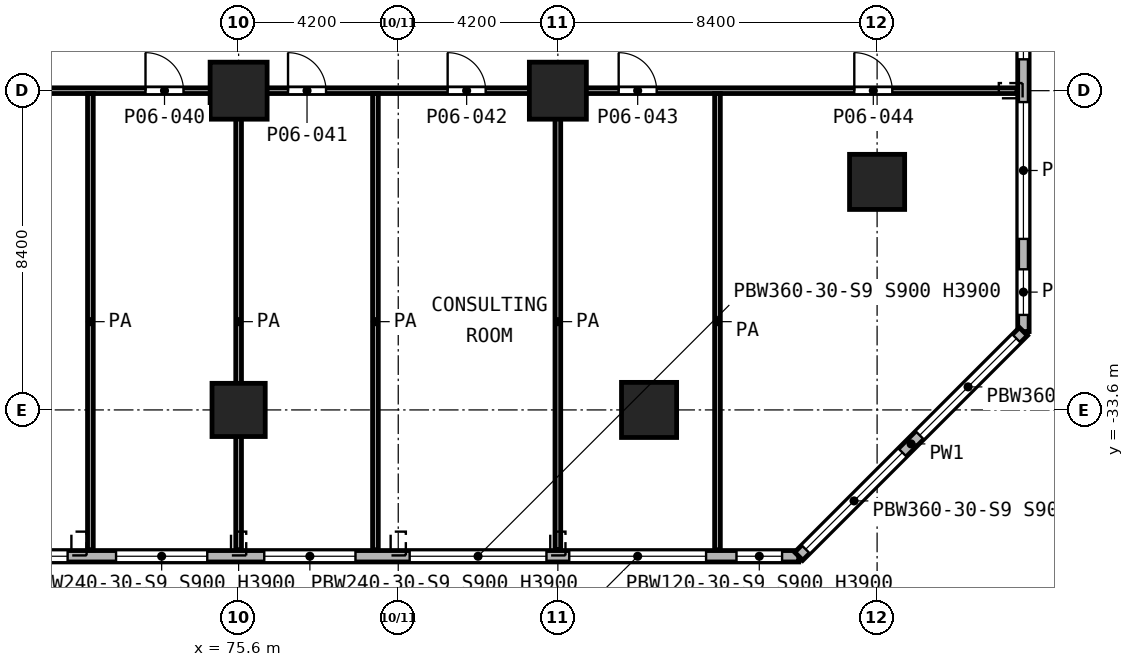
"""IFC4 building model, lengths in metres.
Left out: names, types, materials, properties, quantities, classifications, styles, units other than length and angle.
Written with IfcOpenShell. Run it as: python <this file> out.ifc"""

import sys

from ifc_helpers import new_model, si_unit, direction, frame, frame_2d, origin, origin_2d, place, context, subcontext, project, spatial, rectangle, extrude, element, fill, save


model = new_model("IFC4")
c1 = context("Model", 3, precision=1e-05, world=origin(), true_north=direction((0.0, 1.0)))
c2 = subcontext(c1, "Body", "Model", "MODEL_VIEW")
j1 = project(units=[si_unit("LENGTHUNIT", "METRE"), si_unit("PLANEANGLEUNIT", "RADIAN")], contexts=[c1])
p1 = place(None, origin())
s1 = spatial("IfcSite", under=j1, at=p1, CompositionType="ELEMENT")
p2 = place(p1, origin())
s2 = spatial("IfcBuilding", under=s1, at=p2, CompositionType="ELEMENT")
p3 = place(p2, frame((0.0, 0.0, 29.0)))
s3 = spatial("IfcBuildingStorey", under=s2, at=p3, CompositionType="ELEMENT", Elevation=29.0)
for number, where, z_axis, x_axis in (
    (1, (75.6, -25.2, 0.0), (0.0, 0.0, 1.0), (1.0, 0.0, 0.0)),
    (2, (84.0, -25.2, 0.0), (0.0, 0.0, 1.0), (1.0, 0.0, 0.0)),
):
    element("IfcColumn", number, at=place(p3, frame(where, z_axis=z_axis, x_axis=x_axis)), inside=s3, PredefinedType="COLUMN", context=c2, shape_type="SweptSolid", body=[
        extrude(rectangle(XDim=1.5, YDim=1.5, at=origin_2d()), origin(), (0.0, 0.0, 1.0), 5.2),
    ])
p4 = place(p3, frame((92.4, -27.6, 0.0), z_axis=(0.0, 0.0, 1.0), x_axis=(1.0, 0.0, 0.0)))
e3 = element("IfcColumn", 3, at=p4, inside=s3, PredefinedType="COLUMN", context=c2, shape_type="SweptSolid", body=[
    extrude(rectangle(XDim=1.45, YDim=1.45, at=origin_2d()), origin(), (0.0, 0.0, 1.0), 5.2),
])
p5 = place(p3, frame((75.6, -33.6, 0.0), z_axis=(0.0, 0.0, 1.0), x_axis=(1.0, 0.0, 0.0)))
e4 = element("IfcColumn", 4, at=p5, inside=s3, PredefinedType="COLUMN", context=c2, shape_type="SweptSolid", body=[
    extrude(rectangle(XDim=1.4, YDim=1.4, at=origin_2d()), origin(), (0.0, 0.0, 1.0), 5.2),
])
p6 = place(p3, frame((86.4, -33.6, 0.0), z_axis=(0.0, 0.0, 1.0), x_axis=(1.0, 0.0, 0.0)))
e5 = element("IfcColumn", 5, at=p6, inside=s3, PredefinedType="COLUMN", context=c2, shape_type="SweptSolid", body=[
    extrude(rectangle(XDim=1.45, YDim=1.45, at=origin_2d()), origin(), (0.0, 0.0, 1.0), 5.2),
])
p7 = place(p3, frame((43.538, -37.45, 0.0), z_axis=(0.0, 0.0, 1.0), x_axis=(1.0, 0.0, 0.0)))
e6 = element("IfcWall", 6, at=p7, inside=s3, PredefinedType="SOLIDWALL", context=c2, shape_type="SweptSolid", body=[
    extrude(rectangle(XDim=46.8, YDim=0.3, at=frame_2d((23.4, 0.0))), origin(), (0.0, 0.0, 1.0), 4.7),
])
p8 = place(p7, frame((0.762, 0.0, 0.9)))
e7 = element("IfcOpeningElement", 7, at=p8, cuts=e6, PredefinedType="OPENING", context=c2, shape_type="SweptSolid", body=[
    extrude(rectangle(XDim=1.2, YDim=3.0, at=frame_2d((0.6, 1.5))), frame((0.0, 0.16, 0.0), z_axis=(0.0, -1.0, 0.0), x_axis=(1.0, 0.0, 0.0)), (0.0, 0.0, 1.0), 0.32),
])
p9 = place(p7, frame((2.962, 0.0, 0.9)))
e8 = element("IfcOpeningElement", 8, at=p9, cuts=e6, PredefinedType="OPENING", context=c2, shape_type="SweptSolid", body=[
    extrude(rectangle(XDim=3.6, YDim=3.0, at=frame_2d((1.8, 1.5))), frame((0.0, 0.16, 0.0), z_axis=(0.0, -1.0, 0.0), x_axis=(1.0, 0.0, 0.0)), (0.0, 0.0, 1.0), 0.32),
])
p10 = place(p7, frame((7.162, 0.0, 0.9)))
e9 = element("IfcOpeningElement", 9, at=p10, cuts=e6, PredefinedType="OPENING", context=c2, shape_type="SweptSolid", body=[
    extrude(rectangle(XDim=3.6, YDim=3.0, at=frame_2d((1.8, 1.5))), frame((0.0, 0.16, 0.0), z_axis=(0.0, -1.0, 0.0), x_axis=(1.0, 0.0, 0.0)), (0.0, 0.0, 1.0), 0.32),
])
p11 = place(p7, frame((12.187, 0.0, 0.9)))
e10 = element("IfcOpeningElement", 10, at=p11, cuts=e6, PredefinedType="OPENING", context=c2, shape_type="SweptSolid", body=[
    extrude(rectangle(XDim=2.4, YDim=3.0, at=frame_2d((1.2, 1.5))), frame((0.0, 0.16, 0.0), z_axis=(0.0, -1.0, 0.0), x_axis=(1.0, 0.0, 0.0)), (0.0, 0.0, 1.0), 0.32),
])
p12 = place(p7, frame((16.087, 0.0, 0.9)))
e11 = element("IfcOpeningElement", 11, at=p12, cuts=e6, PredefinedType="OPENING", context=c2, shape_type="SweptSolid", body=[
    extrude(rectangle(XDim=2.4, YDim=3.0, at=frame_2d((1.2, 1.5))), frame((0.0, 0.16, 0.0), z_axis=(0.0, -1.0, 0.0), x_axis=(1.0, 0.0, 0.0)), (0.0, 0.0, 1.0), 0.32),
])
p13 = place(p7, frame((19.762, 0.0, 0.9)))
e12 = element("IfcOpeningElement", 12, at=p13, cuts=e6, PredefinedType="OPENING", context=c2, shape_type="SweptSolid", body=[
    extrude(rectangle(XDim=3.6, YDim=3.0, at=frame_2d((1.8, 1.5))), frame((0.0, 0.16, 0.0), z_axis=(0.0, -1.0, 0.0), x_axis=(1.0, 0.0, 0.0)), (0.0, 0.0, 1.0), 0.32),
])
p14 = place(p7, frame((23.962, 0.0, 0.9)))
e13 = element("IfcOpeningElement", 13, at=p14, cuts=e6, PredefinedType="OPENING", context=c2, shape_type="SweptSolid", body=[
    extrude(rectangle(XDim=3.6, YDim=3.0, at=frame_2d((1.8, 1.5))), frame((0.0, 0.16, 0.0), z_axis=(0.0, -1.0, 0.0), x_axis=(1.0, 0.0, 0.0)), (0.0, 0.0, 1.0), 0.32),
])
p15 = place(p7, frame((28.837, 0.0, 0.9)))
e14 = element("IfcOpeningElement", 14, at=p15, cuts=e6, PredefinedType="OPENING", context=c2, shape_type="SweptSolid", body=[
    extrude(rectangle(XDim=2.4, YDim=3.0, at=frame_2d((1.2, 1.5))), frame((0.0, 0.16, 0.0), z_axis=(0.0, -1.0, 0.0), x_axis=(1.0, 0.0, 0.0)), (0.0, 0.0, 1.0), 0.32),
])
p16 = place(p7, frame((32.737, 0.0, 0.9)))
e15 = element("IfcOpeningElement", 15, at=p16, cuts=e6, PredefinedType="OPENING", context=c2, shape_type="SweptSolid", body=[
    extrude(rectangle(XDim=2.4, YDim=3.0, at=frame_2d((1.2, 1.5))), frame((0.0, 0.16, 0.0), z_axis=(0.0, -1.0, 0.0), x_axis=(1.0, 0.0, 0.0)), (0.0, 0.0, 1.0), 0.32),
])
p17 = place(p7, frame((36.562, 0.0, 0.9)))
e16 = element("IfcOpeningElement", 16, at=p17, cuts=e6, PredefinedType="OPENING", context=c2, shape_type="SweptSolid", body=[
    extrude(rectangle(XDim=3.6, YDim=3.0, at=frame_2d((1.8, 1.5))), frame((0.0, 0.16, 0.0), z_axis=(0.0, -1.0, 0.0), x_axis=(1.0, 0.0, 0.0)), (0.0, 0.0, 1.0), 0.32),
])
p18 = place(p7, frame((40.762, 0.0, 0.9)))
e17 = element("IfcOpeningElement", 17, at=p18, cuts=e6, PredefinedType="OPENING", context=c2, shape_type="SweptSolid", body=[
    extrude(rectangle(XDim=3.6, YDim=3.0, at=frame_2d((1.8, 1.5))), frame((0.0, 0.16, 0.0), z_axis=(0.0, -1.0, 0.0), x_axis=(1.0, 0.0, 0.0)), (0.0, 0.0, 1.0), 0.32),
])
p19 = place(p7, frame((45.162, 0.0, 0.9)))
e18 = element("IfcOpeningElement", 18, at=p19, cuts=e6, PredefinedType="OPENING", context=c2, shape_type="SweptSolid", body=[
    extrude(rectangle(XDim=1.2, YDim=3.0, at=frame_2d((0.6, 1.5))), frame((0.0, 0.16, 0.0), z_axis=(0.0, -1.0, 0.0), x_axis=(1.0, 0.0, 0.0)), (0.0, 0.0, 1.0), 0.32),
])
p20 = place(p3, frame((90.338, -37.45, 0.0), z_axis=(0.0, 0.0, 1.0), x_axis=(0.707106781187, 0.707106781187, 0.0)))
e19 = element("IfcWall", 19, at=p20, inside=s3, PredefinedType="SOLIDWALL", context=c2, shape_type="SweptSolid", body=[
    extrude(rectangle(XDim=8.361, YDim=0.3, at=frame_2d((4.181, 0.0))), origin(), (0.0, 0.0, 1.0), 4.7),
])
p21 = place(p20, frame((0.259, 0.0, 0.9)))
e20 = element("IfcOpeningElement", 20, at=p21, cuts=e19, PredefinedType="OPENING", context=c2, shape_type="SweptSolid", body=[
    extrude(rectangle(XDim=3.6, YDim=3.0, at=frame_2d((1.8, 1.5))), frame((0.0, 0.16, 0.0), z_axis=(0.0, -1.0, 0.0), x_axis=(1.0, 0.0, 0.0)), (0.0, 0.0, 1.0), 0.32),
])
p22 = place(p20, frame((4.502, 0.0, 0.9)))
e21 = element("IfcOpeningElement", 21, at=p22, cuts=e19, PredefinedType="OPENING", context=c2, shape_type="SweptSolid", body=[
    extrude(rectangle(XDim=3.6, YDim=3.0, at=frame_2d((1.8, 1.5))), frame((0.0, 0.16, 0.0), z_axis=(0.0, -1.0, 0.0), x_axis=(1.0, 0.0, 0.0)), (0.0, 0.0, 1.0), 0.32),
])
p23 = place(p3, frame((96.25, -31.538, 0.0), z_axis=(0.0, 0.0, 1.0), x_axis=(0.0, 1.0, 0.0)))
e22 = element("IfcWall", 22, at=p23, inside=s3, PredefinedType="SOLIDWALL", context=c2, shape_type="SweptSolid", body=[
    extrude(rectangle(XDim=29.476, YDim=0.3, at=frame_2d((14.738, 0.0))), origin(), (0.0, 0.0, 1.0), 4.7),
])
p24 = place(p23, frame((0.438, 0.0, 0.9)))
e23 = element("IfcOpeningElement", 23, at=p24, cuts=e22, PredefinedType="OPENING", context=c2, shape_type="SweptSolid", body=[
    extrude(rectangle(XDim=1.2, YDim=3.0, at=frame_2d((0.6, 1.5))), frame((0.0, 0.16, 0.0), z_axis=(0.0, -1.0, 0.0), x_axis=(1.0, 0.0, 0.0)), (0.0, 0.0, 1.0), 0.32),
])
p25 = place(p23, frame((2.438, 0.0, 0.9)))
e24 = element("IfcOpeningElement", 24, at=p25, cuts=e22, PredefinedType="OPENING", context=c2, shape_type="SweptSolid", body=[
    extrude(rectangle(XDim=3.6, YDim=3.0, at=frame_2d((1.8, 1.5))), frame((0.0, 0.16, 0.0), z_axis=(0.0, -1.0, 0.0), x_axis=(1.0, 0.0, 0.0)), (0.0, 0.0, 1.0), 0.32),
])
p26 = place(p23, frame((7.163, 0.0, 0.9)))
e25 = element("IfcOpeningElement", 25, at=p26, cuts=e22, PredefinedType="OPENING", context=c2, shape_type="SweptSolid", body=[
    extrude(rectangle(XDim=1.2, YDim=3.0, at=frame_2d((0.6, 1.5))), frame((0.0, 0.16, 0.0), z_axis=(0.0, -1.0, 0.0), x_axis=(1.0, 0.0, 0.0)), (0.0, 0.0, 1.0), 0.32),
])
p27 = place(p23, frame((10.838, 0.0, 0.9)))
e26 = element("IfcOpeningElement", 26, at=p27, cuts=e22, PredefinedType="OPENING", context=c2, shape_type="SweptSolid", body=[
    extrude(rectangle(XDim=3.6, YDim=3.0, at=frame_2d((1.8, 1.5))), frame((0.0, 0.16, 0.0), z_axis=(0.0, -1.0, 0.0), x_axis=(1.0, 0.0, 0.0)), (0.0, 0.0, 1.0), 0.32),
])
p28 = place(p23, frame((15.038, 0.0, 0.9)))
e27 = element("IfcOpeningElement", 27, at=p28, cuts=e22, PredefinedType="OPENING", context=c2, shape_type="SweptSolid", body=[
    extrude(rectangle(XDim=3.6, YDim=3.0, at=frame_2d((1.8, 1.5))), frame((0.0, 0.16, 0.0), z_axis=(0.0, -1.0, 0.0), x_axis=(1.0, 0.0, 0.0)), (0.0, 0.0, 1.0), 0.32),
])
p29 = place(p23, frame((21.113, 0.0, 0.9)))
e28 = element("IfcOpeningElement", 28, at=p29, cuts=e22, PredefinedType="OPENING", context=c2, shape_type="SweptSolid", body=[
    extrude(rectangle(XDim=1.2, YDim=3.0, at=frame_2d((0.6, 1.5))), frame((0.0, 0.16, 0.0), z_axis=(0.0, -1.0, 0.0), x_axis=(1.0, 0.0, 0.0)), (0.0, 0.0, 1.0), 0.32),
])
p30 = place(p23, frame((23.438, 0.0, 0.9)))
e29 = element("IfcOpeningElement", 29, at=p30, cuts=e22, PredefinedType="OPENING", context=c2, shape_type="SweptSolid", body=[
    extrude(rectangle(XDim=3.6, YDim=3.0, at=frame_2d((1.8, 1.5))), frame((0.0, 0.16, 0.0), z_axis=(0.0, -1.0, 0.0), x_axis=(1.0, 0.0, 0.0)), (0.0, 0.0, 1.0), 0.32),
])
p31 = place(p23, frame((27.838, 0.0, 0.9)))
e30 = element("IfcOpeningElement", 30, at=p31, cuts=e22, PredefinedType="OPENING", context=c2, shape_type="SweptSolid", body=[
    extrude(rectangle(XDim=1.2, YDim=3.0, at=frame_2d((0.6, 1.5))), frame((0.0, 0.16, 0.0), z_axis=(0.0, -1.0, 0.0), x_axis=(1.0, 0.0, 0.0)), (0.0, 0.0, 1.0), 0.32),
])
p32 = place(p3, frame((25.275, -25.2, 0.0), z_axis=(0.0, 0.0, 1.0), x_axis=(1.0, 0.0, 0.0)))
e31 = element("IfcWall", 31, at=p32, inside=s3, PredefinedType="PARTITIONING", context=c2, shape_type="SweptSolid", body=[
    extrude(rectangle(XDim=70.805, YDim=0.15, at=frame_2d((35.403, 0.0))), origin(), (0.0, 0.0, 1.0), 4.7),
])
p33 = place(p32, frame((18.325, 0.0, 0.0)))
e32 = element("IfcOpeningElement", 32, at=p33, cuts=e31, PredefinedType="OPENING", context=c2, shape_type="SweptSolid", body=[
    extrude(rectangle(XDim=1.0, YDim=2.1, at=frame_2d((0.5, 1.05))), frame((0.0, 0.085, 0.0), z_axis=(0.0, -1.0, 0.0), x_axis=(1.0, 0.0, 0.0)), (0.0, 0.0, 1.0), 0.17),
])
p34 = place(p32, frame((22.525, 0.0, 0.0)))
e33 = element("IfcOpeningElement", 33, at=p34, cuts=e31, PredefinedType="OPENING", context=c2, shape_type="SweptSolid", body=[
    extrude(rectangle(XDim=1.0, YDim=2.1, at=frame_2d((0.5, 1.05))), frame((0.0, 0.085, 0.0), z_axis=(0.0, -1.0, 0.0), x_axis=(1.0, 0.0, 0.0)), (0.0, 0.0, 1.0), 0.17),
])
p35 = place(p32, frame((27.025, 0.0, 0.0)))
e34 = element("IfcOpeningElement", 34, at=p35, cuts=e31, PredefinedType="OPENING", context=c2, shape_type="SweptSolid", body=[
    extrude(rectangle(XDim=1.0, YDim=2.1, at=frame_2d((0.5, 1.05))), frame((0.0, 0.085, 0.0), z_axis=(0.0, -1.0, 0.0), x_axis=(1.0, 0.0, 0.0)), (0.0, 0.0, 1.0), 0.17),
])
p36 = place(p32, frame((31.225, 0.0, 0.0)))
e35 = element("IfcOpeningElement", 35, at=p36, cuts=e31, PredefinedType="OPENING", context=c2, shape_type="SweptSolid", body=[
    extrude(rectangle(XDim=1.0, YDim=2.1, at=frame_2d((0.5, 1.05))), frame((0.0, 0.085, 0.0), z_axis=(0.0, -1.0, 0.0), x_axis=(1.0, 0.0, 0.0)), (0.0, 0.0, 1.0), 0.17),
])
p37 = place(p32, frame((34.975, 0.0, 0.0)))
e36 = element("IfcOpeningElement", 36, at=p37, cuts=e31, PredefinedType="OPENING", context=c2, shape_type="SweptSolid", body=[
    extrude(rectangle(XDim=1.0, YDim=2.1, at=frame_2d((0.5, 1.05))), frame((0.0, 0.085, 0.0), z_axis=(0.0, -1.0, 0.0), x_axis=(1.0, 0.0, 0.0)), (0.0, 0.0, 1.0), 0.17),
])
p38 = place(p32, frame((39.175, 0.0, 0.0)))
e37 = element("IfcOpeningElement", 37, at=p38, cuts=e31, PredefinedType="OPENING", context=c2, shape_type="SweptSolid", body=[
    extrude(rectangle(XDim=1.0, YDim=2.1, at=frame_2d((0.5, 1.05))), frame((0.0, 0.085, 0.0), z_axis=(0.0, -1.0, 0.0), x_axis=(1.0, 0.0, 0.0)), (0.0, 0.0, 1.0), 0.17),
])
p39 = place(p32, frame((43.675, 0.0, 0.0)))
e38 = element("IfcOpeningElement", 38, at=p39, cuts=e31, PredefinedType="OPENING", context=c2, shape_type="SweptSolid", body=[
    extrude(rectangle(XDim=1.0, YDim=2.1, at=frame_2d((0.5, 1.05))), frame((0.0, 0.085, 0.0), z_axis=(0.0, -1.0, 0.0), x_axis=(1.0, 0.0, 0.0)), (0.0, 0.0, 1.0), 0.17),
])
p40 = place(p32, frame((47.875, 0.0, 0.0)))
e39 = element("IfcOpeningElement", 39, at=p40, cuts=e31, PredefinedType="OPENING", context=c2, shape_type="SweptSolid", body=[
    extrude(rectangle(XDim=1.0, YDim=2.1, at=frame_2d((0.5, 1.05))), frame((0.0, 0.085, 0.0), z_axis=(0.0, -1.0, 0.0), x_axis=(1.0, 0.0, 0.0)), (0.0, 0.0, 1.0), 0.17),
])
p41 = place(p32, frame((51.625, 0.0, 0.0)))
e40 = element("IfcOpeningElement", 40, at=p41, cuts=e31, PredefinedType="OPENING", context=c2, shape_type="SweptSolid", body=[
    extrude(rectangle(XDim=1.0, YDim=2.1, at=frame_2d((0.5, 1.05))), frame((0.0, 0.085, 0.0), z_axis=(0.0, -1.0, 0.0), x_axis=(1.0, 0.0, 0.0)), (0.0, 0.0, 1.0), 0.17),
])
p42 = place(p32, frame((55.825, 0.0, 0.0)))
e41 = element("IfcOpeningElement", 41, at=p42, cuts=e31, PredefinedType="OPENING", context=c2, shape_type="SweptSolid", body=[
    extrude(rectangle(XDim=1.0, YDim=2.1, at=frame_2d((0.5, 1.05))), frame((0.0, 0.085, 0.0), z_axis=(0.0, -1.0, 0.0), x_axis=(1.0, 0.0, 0.0)), (0.0, 0.0, 1.0), 0.17),
])
p43 = place(p32, frame((60.325, 0.0, 0.0)))
e42 = element("IfcOpeningElement", 42, at=p43, cuts=e31, PredefinedType="OPENING", context=c2, shape_type="SweptSolid", body=[
    extrude(rectangle(XDim=1.0, YDim=2.1, at=frame_2d((0.5, 1.05))), frame((0.0, 0.085, 0.0), z_axis=(0.0, -1.0, 0.0), x_axis=(1.0, 0.0, 0.0)), (0.0, 0.0, 1.0), 0.17),
])
p44 = place(p32, frame((66.525, 0.0, 0.0)))
e43 = element("IfcOpeningElement", 43, at=p44, cuts=e31, PredefinedType="OPENING", context=c2, shape_type="SweptSolid", body=[
    extrude(rectangle(XDim=1.0, YDim=2.1, at=frame_2d((0.5, 1.05))), frame((0.0, 0.085, 0.0), z_axis=(0.0, -1.0, 0.0), x_axis=(1.0, 0.0, 0.0)), (0.0, 0.0, 1.0), 0.17),
])
p45 = place(p32, frame((9.125, 0.0, 0.0)))
e44 = element("IfcOpeningElement", 44, at=p45, cuts=e31, PredefinedType="OPENING", context=c2, shape_type="SweptSolid", body=[
    extrude(rectangle(XDim=1.5, YDim=2.1, at=frame_2d((0.75, 1.05))), frame((0.0, 0.085, 0.0), z_axis=(0.0, -1.0, 0.0), x_axis=(1.0, 0.0, 0.0)), (0.0, 0.0, 1.0), 0.17),
])
for number, where, z_axis, x_axis in (
    (45, (71.7, -37.28, 0.0), (0.0, 0.0, 1.0), (0.0, 1.0, 0.0)),
    (46, (75.6, -37.28, 0.0), (0.0, 0.0, 1.0), (0.0, 1.0, 0.0)),
    (47, (79.2, -37.28, 0.0), (0.0, 0.0, 1.0), (0.0, 1.0, 0.0)),
    (48, (84.0, -37.28, 0.0), (0.0, 0.0, 1.0), (0.0, 1.0, 0.0)),
    (49, (88.2, -37.28, 0.0), (0.0, 0.0, 1.0), (0.0, 1.0, 0.0)),
):
    element("IfcWall", number, at=place(p3, frame(where, z_axis=z_axis, x_axis=x_axis)), inside=s3, PredefinedType="PARTITIONING", context=c2, shape_type="SweptSolid", body=[
        extrude(rectangle(XDim=12.005, YDim=0.15, at=frame_2d((6.002, 0.0))), origin(), (0.0, 0.0, 1.0), 4.7),
    ])
p46 = place(p14, origin())
e50 = element("IfcWindow", 50, at=p46, inside=s3, PartitioningType="SINGLE_PANEL", PredefinedType="WINDOW", context=c2, shape_type="SweptSolid", body=[
    extrude(rectangle(XDim=3.6, YDim=3.0, at=frame_2d((1.8, 1.5))), frame((0.0, 0.03, 0.0), z_axis=(0.0, -1.0, 0.0), x_axis=(1.0, 0.0, 0.0)), (0.0, 0.0, 1.0), 0.06),
])
fill(e13, e50)
p47 = place(p15, origin())
e51 = element("IfcWindow", 51, at=p47, inside=s3, PartitioningType="SINGLE_PANEL", PredefinedType="WINDOW", context=c2, shape_type="SweptSolid", body=[
    extrude(rectangle(XDim=2.4, YDim=3.0, at=frame_2d((1.2, 1.5))), frame((0.0, 0.03, 0.0), z_axis=(0.0, -1.0, 0.0), x_axis=(1.0, 0.0, 0.0)), (0.0, 0.0, 1.0), 0.06),
])
fill(e14, e51)
p48 = place(p16, origin())
e52 = element("IfcWindow", 52, at=p48, inside=s3, PartitioningType="SINGLE_PANEL", PredefinedType="WINDOW", context=c2, shape_type="SweptSolid", body=[
    extrude(rectangle(XDim=2.4, YDim=3.0, at=frame_2d((1.2, 1.5))), frame((0.0, 0.03, 0.0), z_axis=(0.0, -1.0, 0.0), x_axis=(1.0, 0.0, 0.0)), (0.0, 0.0, 1.0), 0.06),
])
fill(e15, e52)
p49 = place(p17, origin())
e53 = element("IfcWindow", 53, at=p49, inside=s3, PartitioningType="SINGLE_PANEL", PredefinedType="WINDOW", context=c2, shape_type="SweptSolid", body=[
    extrude(rectangle(XDim=3.6, YDim=3.0, at=frame_2d((1.8, 1.5))), frame((0.0, 0.03, 0.0), z_axis=(0.0, -1.0, 0.0), x_axis=(1.0, 0.0, 0.0)), (0.0, 0.0, 1.0), 0.06),
])
fill(e16, e53)
p50 = place(p18, origin())
e54 = element("IfcWindow", 54, at=p50, inside=s3, PartitioningType="SINGLE_PANEL", PredefinedType="WINDOW", context=c2, shape_type="SweptSolid", body=[
    extrude(rectangle(XDim=3.6, YDim=3.0, at=frame_2d((1.8, 1.5))), frame((0.0, 0.03, 0.0), z_axis=(0.0, -1.0, 0.0), x_axis=(1.0, 0.0, 0.0)), (0.0, 0.0, 1.0), 0.06),
])
fill(e17, e54)
p51 = place(p19, origin())
e55 = element("IfcWindow", 55, at=p51, inside=s3, PartitioningType="SINGLE_PANEL", PredefinedType="WINDOW", context=c2, shape_type="SweptSolid", body=[
    extrude(rectangle(XDim=1.2, YDim=3.0, at=frame_2d((0.6, 1.5))), frame((0.0, 0.03, 0.0), z_axis=(0.0, -1.0, 0.0), x_axis=(1.0, 0.0, 0.0)), (0.0, 0.0, 1.0), 0.06),
])
fill(e18, e55)
p52 = place(p21, origin())
e56 = element("IfcWindow", 56, at=p52, inside=s3, PartitioningType="SINGLE_PANEL", PredefinedType="WINDOW", context=c2, shape_type="SweptSolid", body=[
    extrude(rectangle(XDim=3.6, YDim=3.0, at=frame_2d((1.8, 1.5))), frame((0.0, 0.03, 0.0), z_axis=(0.0, -1.0, 0.0), x_axis=(1.0, 0.0, 0.0)), (0.0, 0.0, 1.0), 0.06),
])
fill(e20, e56)
p53 = place(p22, origin())
e57 = element("IfcWindow", 57, at=p53, inside=s3, PartitioningType="SINGLE_PANEL", PredefinedType="WINDOW", context=c2, shape_type="SweptSolid", body=[
    extrude(rectangle(XDim=3.6, YDim=3.0, at=frame_2d((1.8, 1.5))), frame((0.0, 0.03, 0.0), z_axis=(0.0, -1.0, 0.0), x_axis=(1.0, 0.0, 0.0)), (0.0, 0.0, 1.0), 0.06),
])
fill(e21, e57)
p54 = place(p24, origin())
e58 = element("IfcWindow", 58, at=p54, inside=s3, PartitioningType="SINGLE_PANEL", PredefinedType="WINDOW", context=c2, shape_type="SweptSolid", body=[
    extrude(rectangle(XDim=1.2, YDim=3.0, at=frame_2d((0.6, 1.5))), frame((0.0, 0.03, 0.0), z_axis=(0.0, -1.0, 0.0), x_axis=(1.0, 0.0, 0.0)), (0.0, 0.0, 1.0), 0.06),
])
fill(e23, e58)
p55 = place(p25, origin())
e59 = element("IfcWindow", 59, at=p55, inside=s3, PartitioningType="SINGLE_PANEL", PredefinedType="WINDOW", context=c2, shape_type="SweptSolid", body=[
    extrude(rectangle(XDim=3.6, YDim=3.0, at=frame_2d((1.8, 1.5))), frame((0.0, 0.03, 0.0), z_axis=(0.0, -1.0, 0.0), x_axis=(1.0, 0.0, 0.0)), (0.0, 0.0, 1.0), 0.06),
])
fill(e24, e59)
p56 = place(p26, origin())
e60 = element("IfcWindow", 60, at=p56, inside=s3, PartitioningType="SINGLE_PANEL", PredefinedType="WINDOW", context=c2, shape_type="SweptSolid", body=[
    extrude(rectangle(XDim=1.2, YDim=3.0, at=frame_2d((0.6, 1.5))), frame((0.0, 0.03, 0.0), z_axis=(0.0, -1.0, 0.0), x_axis=(1.0, 0.0, 0.0)), (0.0, 0.0, 1.0), 0.06),
])
fill(e25, e60)
p57 = place(p40, origin())
e61 = element("IfcDoor", 61, at=p57, inside=s3, OperationType="SINGLE_SWING_LEFT", PredefinedType="DOOR", context=c2, shape_type="SweptSolid", body=[
    extrude(rectangle(XDim=1.0, YDim=2.1, at=frame_2d((0.5, 1.05))), frame((0.0, 0.025, 0.0), z_axis=(0.0, -1.0, 0.0), x_axis=(1.0, 0.0, 0.0)), (0.0, 0.0, 1.0), 0.05),
])
fill(e39, e61)
p58 = place(p41, origin())
e62 = element("IfcDoor", 62, at=p58, inside=s3, OperationType="SINGLE_SWING_LEFT", PredefinedType="DOOR", context=c2, shape_type="SweptSolid", body=[
    extrude(rectangle(XDim=1.0, YDim=2.1, at=frame_2d((0.5, 1.05))), frame((0.0, 0.025, 0.0), z_axis=(0.0, -1.0, 0.0), x_axis=(1.0, 0.0, 0.0)), (0.0, 0.0, 1.0), 0.05),
])
fill(e40, e62)
p59 = place(p42, origin())
e63 = element("IfcDoor", 63, at=p59, inside=s3, OperationType="SINGLE_SWING_LEFT", PredefinedType="DOOR", context=c2, shape_type="SweptSolid", body=[
    extrude(rectangle(XDim=1.0, YDim=2.1, at=frame_2d((0.5, 1.05))), frame((0.0, 0.025, 0.0), z_axis=(0.0, -1.0, 0.0), x_axis=(1.0, 0.0, 0.0)), (0.0, 0.0, 1.0), 0.05),
])
fill(e41, e63)
p60 = place(p43, origin())
e64 = element("IfcDoor", 64, at=p60, inside=s3, OperationType="SINGLE_SWING_LEFT", PredefinedType="DOOR", context=c2, shape_type="SweptSolid", body=[
    extrude(rectangle(XDim=1.0, YDim=2.1, at=frame_2d((0.5, 1.05))), frame((0.0, 0.025, 0.0), z_axis=(0.0, -1.0, 0.0), x_axis=(1.0, 0.0, 0.0)), (0.0, 0.0, 1.0), 0.05),
])
fill(e42, e64)
p61 = place(p44, origin())
e65 = element("IfcDoor", 65, at=p61, inside=s3, OperationType="SINGLE_SWING_LEFT", PredefinedType="DOOR", context=c2, shape_type="SweptSolid", body=[
    extrude(rectangle(XDim=1.0, YDim=2.1, at=frame_2d((0.5, 1.05))), frame((0.0, 0.025, 0.0), z_axis=(0.0, -1.0, 0.0), x_axis=(1.0, 0.0, 0.0)), (0.0, 0.0, 1.0), 0.05),
])
fill(e43, e65)
save(model, sys.argv[1])
